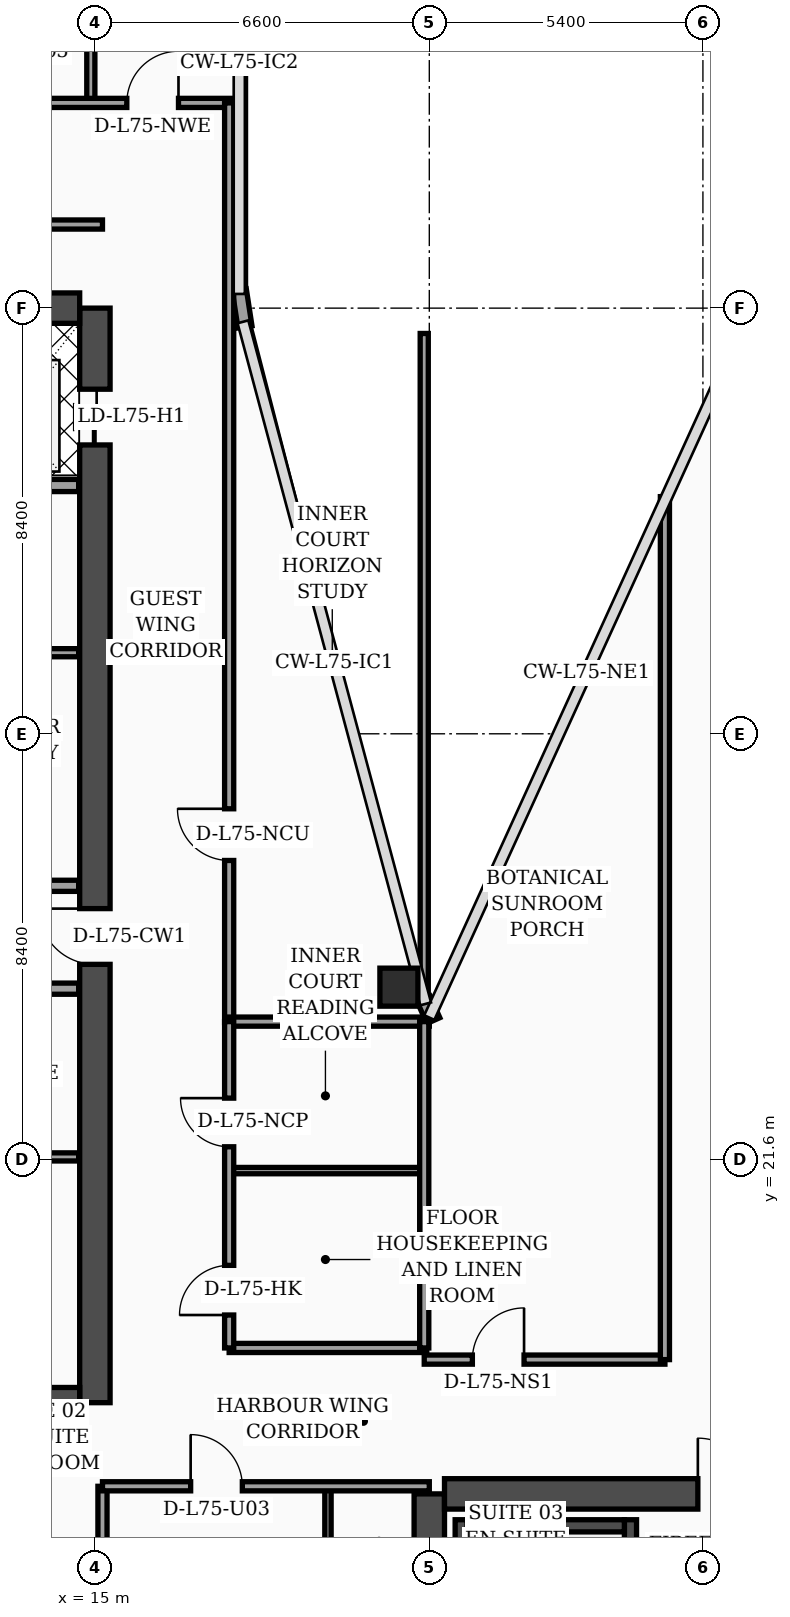
"""IFC4 building model, lengths in metres.
Left out: names, types, materials, properties, quantities, classifications, styles, units other than length and angle.
Written with IfcOpenShell. Run it as: python <this file> out.ifc"""

import sys

from ifc_helpers import new_model, si_unit, direction, frame, frame_2d, origin, origin_2d, place, context, subcontext, project, spatial, rectangle, hollow_rectangle, extrude, element, fill, save


model = new_model("IFC4")
c1 = context("Model", 3, precision=1e-05, world=origin(), true_north=direction((0.0, 1.0)))
c2 = subcontext(c1, "Body", "Model", "MODEL_VIEW")
j1 = project(units=[si_unit("LENGTHUNIT", "METRE"), si_unit("PLANEANGLEUNIT", "RADIAN")], contexts=[c1])
p1 = place(None, origin())
s1 = spatial("IfcSite", under=j1, at=p1, CompositionType="ELEMENT")
p2 = place(p1, origin())
s2 = spatial("IfcBuilding", under=s1, at=p2, CompositionType="ELEMENT")
p3 = place(p2, frame((0.0, 0.0, 302.5)))
s3 = spatial("IfcBuildingStorey", under=s2, at=p3, CompositionType="ELEMENT", Elevation=302.5)
p4 = place(p3, frame((15.0, 16.8, 0.0), z_axis=(0.0, 0.0, 1.0), x_axis=(0.0, 1.0, 0.0)))
e1 = element("IfcWall", 1, at=p4, inside=s3, PredefinedType="SHEAR", context=c2, shape_type="SweptSolid", body=[
    extrude(rectangle(XDim=21.6, YDim=0.6, at=frame_2d((10.8, 0.0))), origin(), (0.0, 0.0, 1.0), 4.05),
])
p5 = place(p4, frame((8.65, 0.0, 0.0)))
e2 = element("IfcOpeningElement", 2, at=p5, cuts=e1, PredefinedType="OPENING", context=c2, shape_type="SweptSolid", body=[
    extrude(rectangle(XDim=1.1, YDim=2.2, at=frame_2d((0.55, 1.1))), frame((0.0, 0.31, 0.0), z_axis=(0.0, -1.0, 0.0), x_axis=(1.0, 0.0, 0.0)), (0.0, 0.0, 1.0), 0.62),
])
p6 = place(p4, frame((18.9, 0.0, 0.0)))
e3 = element("IfcOpeningElement", 3, at=p6, cuts=e1, PredefinedType="OPENING", context=c2, shape_type="SweptSolid", body=[
    extrude(rectangle(XDim=1.1, YDim=2.2, at=frame_2d((0.55, 1.1))), frame((0.0, 0.31, 0.0), z_axis=(0.0, -1.0, 0.0), x_axis=(1.0, 0.0, 0.0)), (0.0, 0.0, 1.0), 0.62),
])
p7 = place(p3, frame((4.5, 38.4, 0.0), z_axis=(0.0, 0.0, 1.0), x_axis=(1.0, 0.0, 0.0)))
e4 = element("IfcWall", 4, at=p7, inside=s3, PredefinedType="SHEAR", context=c2, shape_type="SweptSolid", body=[
    extrude(rectangle(XDim=10.2, YDim=0.6, at=frame_2d((5.1, 0.0))), origin(), (0.0, 0.0, 1.0), 4.05),
])
p8 = place(p7, frame((5.8, 0.0, 0.0)))
e5 = element("IfcOpeningElement", 5, at=p8, cuts=e4, PredefinedType="OPENING", context=c2, shape_type="SweptSolid", body=[
    extrude(rectangle(XDim=1.1, YDim=2.2, at=frame_2d((0.55, 1.1))), frame((0.0, 0.31, 0.0), z_axis=(0.0, -1.0, 0.0), x_axis=(1.0, 0.0, 0.0)), (0.0, 0.0, 1.0), 0.62),
])
p9 = place(p3, frame((4.5, 16.8, 0.0), z_axis=(0.0, 0.0, 1.0), x_axis=(1.0, 0.0, 0.0)))
e6 = element("IfcWall", 6, at=p9, inside=s3, PredefinedType="SHEAR", context=c2, shape_type="SweptSolid", body=[
    extrude(rectangle(XDim=10.2, YDim=0.6, at=frame_2d((5.1, 0.0))), origin(), (0.0, 0.0, 1.0), 4.05),
])
p10 = place(p3, frame((21.6, 4.6, 0.0), z_axis=(0.0, 0.0, 1.0), x_axis=(0.0, 1.0, 0.0)))
e7 = element("IfcWall", 7, at=p10, inside=s3, PredefinedType="SHEAR", context=c2, shape_type="SweptSolid", body=[
    extrude(rectangle(XDim=10.4, YDim=0.6, at=frame_2d((5.2, 0.0))), origin(), (0.0, 0.0, 1.0), 4.05),
])
p11 = place(p3, frame((21.9, 15.0, 0.0), z_axis=(0.0, 0.0, 1.0), x_axis=(1.0, 0.0, 0.0)))
e8 = element("IfcWall", 8, at=p11, inside=s3, PredefinedType="SHEAR", context=c2, shape_type="SweptSolid", body=[
    extrude(rectangle(XDim=10.2, YDim=0.6, at=frame_2d((5.1, 0.0))), origin(), (0.0, 0.0, 1.0), 4.05),
])
p12 = place(p11, frame((5.0, 0.0, 0.0)))
e9 = element("IfcOpeningElement", 9, at=p12, cuts=e8, PredefinedType="OPENING", context=c2, shape_type="SweptSolid", body=[
    extrude(rectangle(XDim=1.1, YDim=2.2, at=frame_2d((0.55, 1.1))), frame((0.0, 0.31, 0.0), z_axis=(0.0, -1.0, 0.0), x_axis=(1.0, 0.0, 0.0)), (0.0, 0.0, 1.0), 0.62),
])
p13 = place(p3, frame((22.23, 4.9, 0.0), z_axis=(0.0, 0.0, 1.0), x_axis=(0.0, 1.0, 0.0)))
e10 = element("IfcWall", 10, at=p13, inside=s3, PredefinedType="SOLIDWALL", context=c2, shape_type="SweptSolid", body=[
    extrude(rectangle(XDim=9.59, YDim=0.24, at=frame_2d((4.795, 0.0))), origin(), (0.0, 0.0, 1.0), 4.05),
])
p14 = place(p3, frame((25.57, 4.9, 0.0), z_axis=(0.0, 0.0, 1.0), x_axis=(0.0, 1.0, 0.0)))
e11 = element("IfcWall", 11, at=p14, inside=s3, PredefinedType="SOLIDWALL", context=c2, shape_type="SweptSolid", body=[
    extrude(rectangle(XDim=9.59, YDim=0.24, at=frame_2d((4.795, 0.0))), origin(), (0.0, 0.0, 1.0), 4.05),
])
p15 = place(p14, frame((0.35, 0.0, 0.0)))
e12 = element("IfcOpeningElement", 12, at=p15, cuts=e11, PredefinedType="OPENING", context=c2, shape_type="SweptSolid", body=[
    extrude(rectangle(XDim=1.15, YDim=2.2, at=frame_2d((0.575, 1.1))), frame((0.0, 0.13, 0.0), z_axis=(0.0, -1.0, 0.0), x_axis=(1.0, 0.0, 0.0)), (0.0, 0.0, 1.0), 0.26),
])
p16 = place(p3, frame((22.35, 14.37, 0.0), z_axis=(0.0, 0.0, 1.0), x_axis=(1.0, 0.0, 0.0)))
e13 = element("IfcWall", 13, at=p16, inside=s3, PredefinedType="SOLIDWALL", context=c2, shape_type="SweptSolid", body=[
    extrude(rectangle(XDim=3.1, YDim=0.24, at=frame_2d((1.55, 0.0))), origin(), (0.0, 0.0, 1.0), 4.05),
])
p17 = place(p3, frame((21.0, 25.0, 0.0), z_axis=(0.0, 0.0, 1.0), x_axis=(1.0, 0.0, 0.0)))
e14 = element("IfcColumn", 14, at=p17, inside=s3, PredefinedType="COLUMN", context=c2, shape_type="SweptSolid", body=[
    extrude(hollow_rectangle(XDim=0.75, YDim=0.75, WallThickness=0.032, at=origin_2d()), origin(), (0.0, 0.0, 1.0), 4.05),
])
p18 = place(p3, frame((21.68, 24.34, 0.0), z_axis=(0.0, 0.0, 1.0), x_axis=(-0.40758134973, 0.913168901875, 0.0)))
e15 = element("IfcWall", 15, at=p18, inside=s3, PredefinedType="SOLIDWALL", context=c2, shape_type="SweptSolid", body=[
    extrude(rectangle(XDim=0.471, YDim=0.28, at=frame_2d((0.235, 0.0))), origin(), (0.0, 0.0, 1.0), 4.05),
])
p19 = place(p3, frame((17.962, 38.03, 0.0), z_axis=(0.0, 0.0, 1.0), x_axis=(-0.15141125477, 0.988470855377, 0.0)))
e16 = element("IfcWall", 16, at=p19, inside=s3, PredefinedType="SOLIDWALL", context=c2, shape_type="SweptSolid", body=[
    extrude(rectangle(XDim=0.739, YDim=0.28, at=frame_2d((0.369, 0.0))), origin(), (0.0, 0.0, 1.0), 4.05),
])
p20 = place(p3, frame((9.68, 21.65, 0.0), z_axis=(0.0, 0.0, 1.0), x_axis=(1.0, 0.0, 0.0)))
e17 = element("IfcWall", 17, at=p20, inside=s3, PredefinedType="PARTITIONING", context=c2, shape_type="SweptSolid", body=[
    extrude(rectangle(XDim=5.0, YDim=0.16, at=frame_2d((2.5, 0.0))), origin(), (0.0, 0.0, 1.0), 4.05),
])
p21 = place(p20, frame((1.1, 0.0, 0.0)))
e18 = element("IfcOpeningElement", 18, at=p21, cuts=e17, PredefinedType="OPENING", context=c2, shape_type="SweptSolid", body=[
    extrude(rectangle(XDim=0.98, YDim=2.15, at=frame_2d((0.49, 1.075))), frame((0.0, 0.09, 0.0), z_axis=(0.0, -1.0, 0.0), x_axis=(1.0, 0.0, 0.0)), (0.0, 0.0, 1.0), 0.18),
])
p22 = place(p3, frame((9.68, 24.97, 0.0), z_axis=(0.0, 0.0, 1.0), x_axis=(1.0, 0.0, 0.0)))
e19 = element("IfcWall", 19, at=p22, inside=s3, PredefinedType="SOLIDWALL", context=c2, shape_type="SweptSolid", body=[
    extrude(rectangle(XDim=5.0, YDim=0.22, at=frame_2d((2.5, 0.0))), origin(), (0.0, 0.0, 1.0), 3.5),
])
p23 = place(p22, frame((0.9, 0.0, 0.0)))
e20 = element("IfcOpeningElement", 20, at=p23, cuts=e19, PredefinedType="OPENING", context=c2, shape_type="SweptSolid", body=[
    extrude(rectangle(XDim=0.98, YDim=2.15, at=frame_2d((0.49, 1.075))), frame((0.0, 0.12, 0.0), z_axis=(0.0, -1.0, 0.0), x_axis=(1.0, 0.0, 0.0)), (0.0, 0.0, 1.0), 0.24),
])
p24 = place(p3, frame((12.25, 27.0, 0.0), z_axis=(0.0, 0.0, 1.0), x_axis=(1.0, 0.0, 0.0)))
e21 = element("IfcWall", 21, at=p24, inside=s3, PredefinedType="SOLIDWALL", context=c2, shape_type="SweptSolid", body=[
    extrude(rectangle(XDim=2.43, YDim=0.22, at=frame_2d((1.215, 0.0))), origin(), (0.0, 0.0, 1.0), 4.05),
])
p25 = place(p3, frame((12.25, 31.6, 0.0), z_axis=(0.0, 0.0, 1.0), x_axis=(1.0, 0.0, 0.0)))
e22 = element("IfcWall", 22, at=p25, inside=s3, PredefinedType="PARTITIONING", context=c2, shape_type="SweptSolid", body=[
    extrude(rectangle(XDim=2.43, YDim=0.16, at=frame_2d((1.215, 0.0))), origin(), (0.0, 0.0, 1.0), 3.65),
])
p26 = place(p25, frame((0.55, 0.0, 0.0)))
e23 = element("IfcOpeningElement", 23, at=p26, cuts=e22, PredefinedType="OPENING", context=c2, shape_type="SweptSolid", body=[
    extrude(rectangle(XDim=0.98, YDim=2.15, at=frame_2d((0.49, 1.075))), frame((0.0, 0.09, 0.0), z_axis=(0.0, -1.0, 0.0), x_axis=(1.0, 0.0, 0.0)), (0.0, 0.0, 1.0), 0.18),
])
p27 = place(p3, frame((9.66, 34.9, 0.0), z_axis=(0.0, 0.0, 1.0), x_axis=(1.0, 0.0, 0.0)))
e24 = element("IfcWall", 24, at=p27, inside=s3, PredefinedType="SOLIDWALL", context=c2, shape_type="SweptSolid", body=[
    extrude(rectangle(XDim=5.02, YDim=0.24, at=frame_2d((2.51, 0.0))), origin(), (0.0, 0.0, 1.0), 4.05),
])
p28 = place(p3, frame((15.15, 2.44, 0.0), z_axis=(0.0, 0.0, 1.0), x_axis=(0.0, 1.0, 0.0)))
e25 = element("IfcWall", 25, at=p28, inside=s3, PredefinedType="PARTITIONING", context=c2, shape_type="SweptSolid", body=[
    extrude(rectangle(XDim=12.71, YDim=0.18, at=frame_2d((6.355, 0.0))), origin(), (0.0, 0.0, 1.0), 2.35),
])
p29 = place(p3, frame((19.6, 2.44, 0.0), z_axis=(0.0, 0.0, 1.0), x_axis=(0.0, 1.0, 0.0)))
e26 = element("IfcWall", 26, at=p29, inside=s3, PredefinedType="PARTITIONING", context=c2, shape_type="SweptSolid", body=[
    extrude(rectangle(XDim=12.71, YDim=0.125, at=frame_2d((6.355, 0.0))), origin(), (0.0, 0.0, 1.0), 2.35),
])
p30 = place(p29, frame((4.34, 0.0, 0.0)))
e27 = element("IfcOpeningElement", 27, at=p30, cuts=e26, PredefinedType="OPENING", context=c2, shape_type="SweptSolid", body=[
    extrude(rectangle(XDim=0.96, YDim=2.2, at=frame_2d((0.48, 1.1))), frame((0.0, 0.073, 0.0), z_axis=(0.0, -1.0, 0.0), x_axis=(1.0, 0.0, 0.0)), (0.0, 0.0, 1.0), 0.145),
])
p31 = place(p29, frame((10.18, 0.0, 0.0)))
e28 = element("IfcOpeningElement", 28, at=p31, cuts=e26, PredefinedType="OPENING", context=c2, shape_type="SweptSolid", body=[
    extrude(rectangle(XDim=0.9, YDim=2.15, at=frame_2d((0.45, 1.075))), frame((0.0, 0.073, 0.0), z_axis=(0.0, -1.0, 0.0), x_axis=(1.0, 0.0, 0.0)), (0.0, 0.0, 1.0), 0.145),
])
p32 = place(p3, frame((15.15, 15.15, 0.0), z_axis=(0.0, 0.0, 1.0), x_axis=(1.0, 0.0, 0.0)))
e29 = element("IfcWall", 29, at=p32, inside=s3, PredefinedType="PARTITIONING", context=c2, shape_type="SweptSolid", body=[
    extrude(rectangle(XDim=6.45, YDim=0.18, at=frame_2d((3.225, 0.0))), origin(), (0.0, 0.0, 1.0), 3.1),
])
p33 = place(p32, frame((1.74, 0.0, 0.0)))
e30 = element("IfcOpeningElement", 30, at=p33, cuts=e29, PredefinedType="OPENING", context=c2, shape_type="SweptSolid", body=[
    extrude(rectangle(XDim=1.02, YDim=2.2, at=frame_2d((0.51, 1.1))), frame((0.0, 0.1, 0.0), z_axis=(0.0, -1.0, 0.0), x_axis=(1.0, 0.0, 0.0)), (0.0, 0.0, 1.0), 0.2),
])
p34 = place(p3, frame((14.92, 42.45, 0.0), z_axis=(0.0, 0.0, 1.0), x_axis=(0.0, 1.0, 0.0)))
e31 = element("IfcWall", 31, at=p34, inside=s3, PredefinedType="PARTITIONING", context=c2, shape_type="SweptSolid", body=[
    extrude(rectangle(XDim=5.35, YDim=0.16, at=frame_2d((2.675, 0.0))), origin(), (0.0, 0.0, 1.0), 3.6),
])
p35 = place(p3, frame((0.08, 42.45, 0.0), z_axis=(0.0, 0.0, 1.0), x_axis=(1.0, 0.0, 0.0)))
e32 = element("IfcWall", 32, at=p35, inside=s3, PredefinedType="PARTITIONING", context=c2, shape_type="SweptSolid", body=[
    extrude(rectangle(XDim=17.77, YDim=0.18, at=frame_2d((8.885, 0.0))), origin(), (0.0, 0.0, 1.0), 3.5),
])
p36 = place(p35, frame((0.9, 0.0, 0.0)))
e33 = element("IfcOpeningElement", 33, at=p36, cuts=e32, PredefinedType="OPENING", context=c2, shape_type="SweptSolid", body=[
    extrude(rectangle(XDim=1.02, YDim=2.2, at=frame_2d((0.51, 1.1))), frame((0.0, 0.1, 0.0), z_axis=(0.0, -1.0, 0.0), x_axis=(1.0, 0.0, 0.0)), (0.0, 0.0, 1.0), 0.2),
])
p37 = place(p35, frame((4.45, 0.0, 0.0)))
e34 = element("IfcOpeningElement", 34, at=p37, cuts=e32, PredefinedType="OPENING", context=c2, shape_type="SweptSolid", body=[
    extrude(rectangle(XDim=1.02, YDim=2.2, at=frame_2d((0.51, 1.1))), frame((0.0, 0.1, 0.0), z_axis=(0.0, -1.0, 0.0), x_axis=(1.0, 0.0, 0.0)), (0.0, 0.0, 1.0), 0.2),
])
p38 = place(p35, frame((10.33, 0.0, 0.0)))
e35 = element("IfcOpeningElement", 35, at=p38, cuts=e32, PredefinedType="OPENING", context=c2, shape_type="SweptSolid", body=[
    extrude(rectangle(XDim=1.02, YDim=2.2, at=frame_2d((0.51, 1.1))), frame((0.0, 0.1, 0.0), z_axis=(0.0, -1.0, 0.0), x_axis=(1.0, 0.0, 0.0)), (0.0, 0.0, 1.0), 0.2),
])
p39 = place(p35, frame((15.55, 0.0, 0.0)))
e36 = element("IfcOpeningElement", 36, at=p39, cuts=e32, PredefinedType="OPENING", context=c2, shape_type="SweptSolid", body=[
    extrude(rectangle(XDim=1.02, YDim=2.2, at=frame_2d((0.51, 1.1))), frame((0.0, 0.1, 0.0), z_axis=(0.0, -1.0, 0.0), x_axis=(1.0, 0.0, 0.0)), (0.0, 0.0, 1.0), 0.2),
])
p40 = place(p3, frame((17.65, 24.3, 0.0), z_axis=(0.0, 0.0, 1.0), x_axis=(0.0, 1.0, 0.0)))
e37 = element("IfcWall", 37, at=p40, inside=s3, PredefinedType="PARTITIONING", context=c2, shape_type="SweptSolid", body=[
    extrude(rectangle(XDim=18.15, YDim=0.18, at=frame_2d((9.075, 0.0))), origin(), (0.0, 0.0, 1.0), 3.5),
])
p41 = place(p40, frame((3.2, 0.0, 0.0)))
e38 = element("IfcOpeningElement", 38, at=p41, cuts=e37, PredefinedType="OPENING", context=c2, shape_type="SweptSolid", body=[
    extrude(rectangle(XDim=1.02, YDim=2.2, at=frame_2d((0.51, 1.1))), frame((0.0, 0.1, 0.0), z_axis=(0.0, -1.0, 0.0), x_axis=(1.0, 0.0, 0.0)), (0.0, 0.0, 1.0), 0.2),
])
p42 = place(p3, frame((3.88, 40.05, 0.0), z_axis=(0.0, 0.0, 1.0), x_axis=(1.0, 0.0, 0.0)))
e39 = element("IfcWall", 39, at=p42, inside=s3, PredefinedType="PARTITIONING", context=c2, shape_type="SweptSolid", body=[
    extrude(rectangle(XDim=11.27, YDim=0.18, at=frame_2d((5.635, 0.0))), origin(), (0.0, 0.0, 1.0), 3.5),
])
p43 = place(p3, frame((17.65, 17.88, 0.0), z_axis=(0.0, 0.0, 1.0), x_axis=(1.0, 0.0, 0.0)))
e40 = element("IfcWall", 40, at=p43, inside=s3, PredefinedType="PARTITIONING", context=c2, shape_type="SweptSolid", body=[
    extrude(rectangle(XDim=3.9, YDim=0.18, at=frame_2d((1.95, 0.0))), origin(), (0.0, 0.0, 1.0), 4.05),
])
p44 = place(p3, frame((17.65, 21.38, 0.0), z_axis=(0.0, 0.0, 1.0), x_axis=(1.0, 0.0, 0.0)))
e41 = element("IfcWall", 41, at=p44, inside=s3, PredefinedType="PARTITIONING", context=c2, shape_type="SweptSolid", body=[
    extrude(rectangle(XDim=3.9, YDim=0.125, at=frame_2d((1.95, 0.0))), origin(), (0.0, 0.0, 1.0), 4.05),
])
p45 = place(p3, frame((17.65, 24.32, 0.0), z_axis=(0.0, 0.0, 1.0), x_axis=(1.0, 0.0, 0.0)))
e42 = element("IfcWall", 42, at=p45, inside=s3, PredefinedType="PARTITIONING", context=c2, shape_type="SweptSolid", body=[
    extrude(rectangle(XDim=3.95, YDim=0.18, at=frame_2d((1.975, 0.0))), origin(), (0.0, 0.0, 1.0), 4.05),
])
p46 = place(p3, frame((21.5, 17.88, 0.0), z_axis=(0.0, 0.0, 1.0), x_axis=(0.0, 1.0, 0.0)))
e43 = element("IfcWall", 43, at=p46, inside=s3, PredefinedType="PARTITIONING", context=c2, shape_type="SweptSolid", body=[
    extrude(rectangle(XDim=6.44, YDim=0.18, at=frame_2d((3.22, 0.0))), origin(), (0.0, 0.0, 1.0), 4.05),
])
p47 = place(p3, frame((17.65, 17.88, 0.0), z_axis=(0.0, 0.0, 1.0), x_axis=(0.0, 1.0, 0.0)))
e44 = element("IfcWall", 44, at=p47, inside=s3, PredefinedType="PARTITIONING", context=c2, shape_type="SweptSolid", body=[
    extrude(rectangle(XDim=6.44, YDim=0.18, at=frame_2d((3.22, 0.0))), origin(), (0.0, 0.0, 1.0), 4.05),
])
p48 = place(p47, frame((0.65, 0.0, 0.0)))
e45 = element("IfcOpeningElement", 45, at=p48, cuts=e44, PredefinedType="OPENING", context=c2, shape_type="SweptSolid", body=[
    extrude(rectangle(XDim=0.98, YDim=2.15, at=frame_2d((0.49, 1.075))), frame((0.0, 0.1, 0.0), z_axis=(0.0, -1.0, 0.0), x_axis=(1.0, 0.0, 0.0)), (0.0, 0.0, 1.0), 0.2),
])
p49 = place(p47, frame((3.97, 0.0, 0.0)))
e46 = element("IfcOpeningElement", 46, at=p49, cuts=e44, PredefinedType="OPENING", context=c2, shape_type="SweptSolid", body=[
    extrude(rectangle(XDim=0.96, YDim=2.2, at=frame_2d((0.48, 1.1))), frame((0.0, 0.1, 0.0), z_axis=(0.0, -1.0, 0.0), x_axis=(1.0, 0.0, 0.0)), (0.0, 0.0, 1.0), 0.2),
])
p50 = place(p3, frame((21.5, 24.85, 0.0), z_axis=(0.0, 0.0, 1.0), x_axis=(0.0, 1.0, 0.0)))
e47 = element("IfcWall", 47, at=p50, inside=s3, PredefinedType="PARTITIONING", context=c2, shape_type="SweptSolid", body=[
    extrude(rectangle(XDim=13.05, YDim=0.16, at=frame_2d((6.525, 0.0))), origin(), (0.0, 0.0, 1.0), 2.35),
])
p51 = place(p3, frame((21.5, 17.65, 0.0), z_axis=(0.0, 0.0, 1.0), x_axis=(1.0, 0.0, 0.0)))
e48 = element("IfcWall", 48, at=p51, inside=s3, PredefinedType="PARTITIONING", context=c2, shape_type="SweptSolid", body=[
    extrude(rectangle(XDim=4.75, YDim=0.18, at=frame_2d((2.375, 0.0))), origin(), (0.0, 0.0, 1.0), 4.05),
])
p52 = place(p51, frame((0.95, 0.0, 0.0)))
e49 = element("IfcOpeningElement", 49, at=p52, cuts=e48, PredefinedType="OPENING", context=c2, shape_type="SweptSolid", body=[
    extrude(rectangle(XDim=1.02, YDim=2.2, at=frame_2d((0.51, 1.1))), frame((0.0, 0.1, 0.0), z_axis=(0.0, -1.0, 0.0), x_axis=(1.0, 0.0, 0.0)), (0.0, 0.0, 1.0), 0.2),
])
p53 = place(p3, frame((26.25, 17.65, 0.0), z_axis=(0.0, 0.0, 1.0), x_axis=(0.0, 1.0, 0.0)))
e50 = element("IfcWall", 50, at=p53, inside=s3, PredefinedType="PARTITIONING", context=c2, shape_type="SweptSolid", body=[
    extrude(rectangle(XDim=17.03, YDim=0.18, at=frame_2d((8.515, 0.0))), origin(), (0.0, 0.0, 1.0), 2.35),
])
p54 = place(p33, origin())
e51 = element("IfcDoor", 51, at=p54, inside=s3, OperationType="SINGLE_SWING_LEFT", PredefinedType="DOOR", context=c2, shape_type="SweptSolid", body=[
    extrude(rectangle(XDim=1.02, YDim=2.2, at=frame_2d((0.51, 1.1))), frame((0.0, 0.025, 0.0), z_axis=(0.0, -1.0, 0.0), x_axis=(1.0, 0.0, 0.0)), (0.0, 0.0, 1.0), 0.05),
])
fill(e30, e51)
p55 = place(p39, origin())
e52 = element("IfcDoor", 52, at=p55, inside=s3, OperationType="SINGLE_SWING_RIGHT", PredefinedType="DOOR", context=c2, shape_type="SweptSolid", body=[
    extrude(rectangle(XDim=1.02, YDim=2.2, at=frame_2d((0.51, 1.1))), frame((0.0, 0.025, 0.0), z_axis=(0.0, -1.0, 0.0), x_axis=(1.0, 0.0, 0.0)), (0.0, 0.0, 1.0), 0.05),
])
fill(e36, e52)
p56 = place(p41, origin())
e53 = element("IfcDoor", 53, at=p56, inside=s3, OperationType="SINGLE_SWING_RIGHT", PredefinedType="DOOR", context=c2, shape_type="SweptSolid", body=[
    extrude(rectangle(XDim=1.02, YDim=2.2, at=frame_2d((0.51, 1.1))), frame((0.0, 0.025, 0.0), z_axis=(0.0, -1.0, 0.0), x_axis=(1.0, 0.0, 0.0)), (0.0, 0.0, 1.0), 0.05),
])
fill(e38, e53)
p57 = place(p48, origin())
e54 = element("IfcDoor", 54, at=p57, inside=s3, OperationType="SINGLE_SWING_LEFT", PredefinedType="DOOR", context=c2, shape_type="SweptSolid", body=[
    extrude(rectangle(XDim=0.98, YDim=2.15, at=frame_2d((0.49, 1.075))), frame((0.0, 0.025, 0.0), z_axis=(0.0, -1.0, 0.0), x_axis=(1.0, 0.0, 0.0)), (0.0, 0.0, 1.0), 0.05),
])
fill(e45, e54)
p58 = place(p49, origin())
e55 = element("IfcDoor", 55, at=p58, inside=s3, OperationType="SINGLE_SWING_RIGHT", PredefinedType="DOOR", context=c2, shape_type="SweptSolid", body=[
    extrude(rectangle(XDim=0.96, YDim=2.2, at=frame_2d((0.48, 1.1))), frame((0.0, 0.025, 0.0), z_axis=(0.0, -1.0, 0.0), x_axis=(1.0, 0.0, 0.0)), (0.0, 0.0, 1.0), 0.05),
])
fill(e46, e55)
p59 = place(p52, origin())
e56 = element("IfcDoor", 56, at=p59, inside=s3, OperationType="SINGLE_SWING_RIGHT", PredefinedType="DOOR", context=c2, shape_type="SweptSolid", body=[
    extrude(rectangle(XDim=1.02, YDim=2.2, at=frame_2d((0.51, 1.1))), frame((0.0, 0.025, 0.0), z_axis=(0.0, -1.0, 0.0), x_axis=(1.0, 0.0, 0.0)), (0.0, 0.0, 1.0), 0.05),
])
fill(e49, e56)
p60 = place(p5, origin())
e57 = element("IfcDoor", 57, at=p60, inside=s3, OperationType="SINGLE_SWING_RIGHT", PredefinedType="DOOR", context=c2, shape_type="SweptSolid", body=[
    extrude(rectangle(XDim=1.1, YDim=2.2, at=frame_2d((0.55, 1.1))), frame((0.0, 0.025, 0.0), z_axis=(0.0, -1.0, 0.0), x_axis=(1.0, 0.0, 0.0)), (0.0, 0.0, 1.0), 0.05),
])
fill(e2, e57)
p61 = place(p6, origin())
e58 = element("IfcDoor", 58, at=p61, inside=s3, OperationType="DOUBLE_DOOR_SLIDING", PredefinedType="DOOR", context=c2, shape_type="SweptSolid", body=[
    extrude(rectangle(XDim=1.1, YDim=2.2, at=frame_2d((0.55, 1.1))), frame((0.0, 0.025, 0.0), z_axis=(0.0, -1.0, 0.0), x_axis=(1.0, 0.0, 0.0)), (0.0, 0.0, 1.0), 0.05),
])
fill(e3, e58)
p62 = place(p12, origin())
e59 = element("IfcDoor", 59, at=p62, inside=s3, OperationType="SINGLE_SWING_LEFT", PredefinedType="DOOR", context=c2, shape_type="SweptSolid", body=[
    extrude(rectangle(XDim=1.1, YDim=2.2, at=frame_2d((0.55, 1.1))), frame((0.0, 0.025, 0.0), z_axis=(0.0, -1.0, 0.0), x_axis=(1.0, 0.0, 0.0)), (0.0, 0.0, 1.0), 0.05),
])
fill(e9, e59)
save(model, sys.argv[1])
